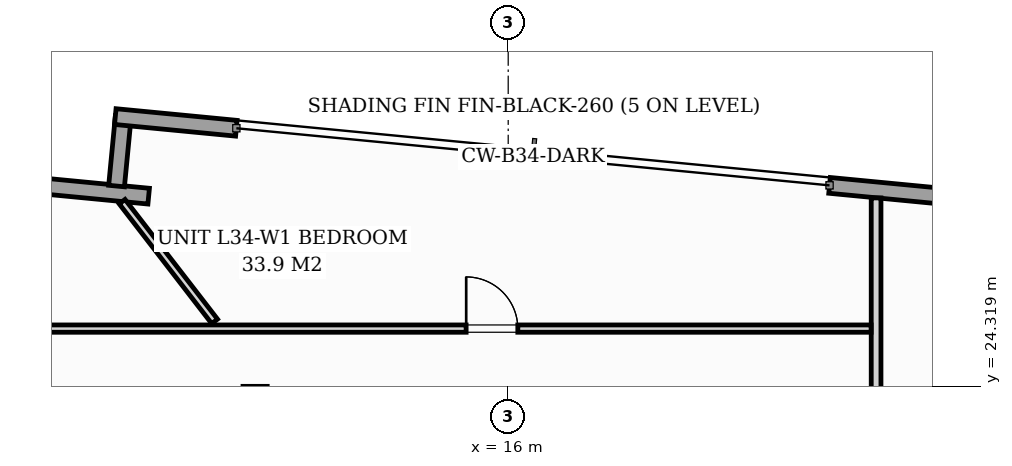
"""IFC4 building model, lengths in metres.
Left out: names, types, materials, properties, quantities, classifications, styles, units other than length and angle.
Written with IfcOpenShell. Run it as: python <this file> out.ifc"""

import sys

from ifc_helpers import new_model, si_unit, direction, frame, frame_2d, origin, origin_2d, place, context, subcontext, project, spatial, rectangle, i_section, extrude, source, transform, mapped, element, fill, save


model = new_model("IFC4")
c1 = context("Model", 3, precision=1e-05, world=origin(), true_north=direction((0.0, 1.0)))
c2 = subcontext(c1, "Body", "Model", "MODEL_VIEW")
j1 = project(units=[si_unit("LENGTHUNIT", "METRE"), si_unit("PLANEANGLEUNIT", "RADIAN")], contexts=[c1])
p1 = place(None, origin())
s1 = spatial("IfcSite", under=j1, at=p1, CompositionType="ELEMENT")
p2 = place(p1, origin())
s2 = spatial("IfcBuilding", under=s1, at=p2, CompositionType="ELEMENT")
p3 = place(p2, frame((0.0, 0.0, 119.4)))
s3 = spatial("IfcBuildingStorey", under=s2, at=p3, CompositionType="ELEMENT", Elevation=119.4)
m1 = source(origin(), c2, "Body", "SweptSolid", [
    extrude(i_section(OverallWidth=0.438, OverallDepth=1.011, WebThickness=0.041, FlangeThickness=0.074, FilletRadius=0.024, at=origin_2d()), origin(), (0.0, 0.0, 1.0), 6.635),
])
p4 = place(p3, frame((12.212, 22.752, 0.175), z_axis=(-0.243413874896, 0.703453219409, 0.66775987721), x_axis=(0.218359881802, -0.631048504974, 0.744376750301)))
e1 = element("IfcColumn", 1, at=p4, inside=s3, PredefinedType="COLUMN", context=c2, shape_type="MappedRepresentation", body=[
    mapped(m1, transform((0.0, 0.0, 0.0), scale=1.0)),
])
m2 = source(origin(), c2, "Body", "SweptSolid", [
    extrude(i_section(OverallWidth=0.438, OverallDepth=1.011, WebThickness=0.041, FlangeThickness=0.074, FilletRadius=0.024, at=origin_2d()), origin(), (0.0, 0.0, 1.0), 5.536),
])
p5 = place(p3, frame((25.221, 25.412, 0.139), z_axis=(-0.550407983816, 0.189202744437, 0.813174872244), x_axis=(0.769008579573, -0.264346699228, 0.582019438809)))
e2 = element("IfcColumn", 2, at=p5, inside=s3, PredefinedType="COLUMN", context=c2, shape_type="MappedRepresentation", body=[
    mapped(m2, transform((0.0, 0.0, 0.0), scale=1.0)),
])
p6 = place(p3, frame((8.045, 27.643, 0.0), z_axis=(0.0, 0.0, 1.0), x_axis=(0.995401395194, -0.095791766065, 0.0)))
e3 = element("IfcWall", 3, at=p6, inside=s3, PredefinedType="STANDARD", context=c2, shape_type="SweptSolid", body=[
    extrude(rectangle(XDim=2.052, YDim=0.26, at=frame_2d((1.026, 0.0))), origin(), (0.0, 0.0, 1.0), 4.78),
])
p7 = place(p3, frame((9.559, 27.612, 0.0), z_axis=(0.0, 0.0, 1.0), x_axis=(0.095971333708, 0.995384098279, 0.0)))
e4 = element("IfcWall", 4, at=p7, inside=s3, PredefinedType="STANDARD", context=c2, shape_type="SweptSolid", body=[
    extrude(rectangle(XDim=1.15, YDim=0.26, at=frame_2d((0.575, 0.0))), origin(), (0.0, 0.0, 1.0), 4.78),
])
p8 = place(p3, frame((9.539, 28.754, 0.0), z_axis=(0.0, 0.0, 1.0), x_axis=(0.995397839199, -0.095828710298, 0.0)))
e5 = element("IfcWall", 5, at=p8, inside=s3, PredefinedType="STANDARD", context=c2, shape_type="SweptSolid", body=[
    extrude(rectangle(XDim=2.0, YDim=0.26, at=frame_2d((1.0, 0.0))), origin(), (0.0, 0.0, 1.0), 4.78),
])
p9 = place(p3, frame((21.284, 27.624, 0.0), z_axis=(0.0, 0.0, 1.0), x_axis=(0.995391866735, -0.09589072759, 0.0)))
e6 = element("IfcWall", 6, at=p9, inside=s3, PredefinedType="STANDARD", context=c2, shape_type="SweptSolid", body=[
    extrude(rectangle(XDim=1.8, YDim=0.26, at=frame_2d((0.9, 0.0))), origin(), (0.0, 0.0, 1.0), 4.78),
])
p10 = place(p3, frame((22.05, 12.632, 0.0), z_axis=(0.0, 0.0, 1.0), x_axis=(0.0, 1.0, 0.0)))
e7 = element("IfcWall", 7, at=p10, inside=s3, PredefinedType="PARTITIONING", context=c2, shape_type="SweptSolid", body=[
    extrude(rectangle(XDim=14.785, YDim=0.16, at=frame_2d((7.393, 0.0))), origin(), (0.0, 0.0, 1.0), 4.78),
])
p11 = place(p10, frame((0.493, 0.0, 0.0)))
e8 = element("IfcOpeningElement", 8, at=p11, cuts=e7, PredefinedType="OPENING", context=c2, shape_type="SweptSolid", body=[
    extrude(rectangle(XDim=0.95, YDim=2.06, at=frame_2d((0.475, 1.03))), frame((0.0, 0.09, 0.0), z_axis=(0.0, -1.0, 0.0), x_axis=(1.0, 0.0, 0.0)), (0.0, 0.0, 1.0), 0.18),
])
p12 = place(p3, frame((6.772, 25.268, 0.0), z_axis=(0.0, 0.0, 1.0), x_axis=(1.0, 0.0, 0.0)))
e9 = element("IfcWall", 9, at=p12, inside=s3, PredefinedType="PARTITIONING", context=c2, shape_type="SweptSolid", body=[
    extrude(rectangle(XDim=15.196, YDim=0.12, at=frame_2d((7.598, 0.0))), origin(), (0.0, 0.0, 1.0), 4.78),
])
p13 = place(p12, frame((8.536, 0.0, 0.0)))
e10 = element("IfcOpeningElement", 10, at=p13, cuts=e9, PredefinedType="OPENING", context=c2, shape_type="SweptSolid", body=[
    extrude(rectangle(XDim=0.85, YDim=2.05, at=frame_2d((0.425, 1.025))), frame((0.0, 0.07, 0.0), z_axis=(0.0, -1.0, 0.0), x_axis=(1.0, 0.0, 0.0)), (0.0, 0.0, 1.0), 0.14),
])
p14 = place(p3, frame((11.172, 25.387, 0.0), z_axis=(0.0, 0.0, 1.0), x_axis=(-0.611369296281, 0.791345426198, 0.0)))
e11 = element("IfcWall", 11, at=p14, inside=s3, PredefinedType="PARTITIONING", context=c2, shape_type="SweptSolid", body=[
    extrude(rectangle(XDim=2.488, YDim=0.12, at=frame_2d((1.244, 0.0))), origin(), (0.0, 0.0, 1.0), 4.78),
])
m3 = source(origin(), c2, "Body", "SweptSolid", [
    extrude(rectangle(XDim=0.85, YDim=2.05, at=frame_2d((0.425, 1.025))), frame((0.0, 0.025, 0.0), z_axis=(0.0, -1.0, 0.0), x_axis=(1.0, 0.0, 0.0)), (0.0, 0.0, 1.0), 0.05),
])
p15 = place(p13, origin())
e12 = element("IfcDoor", 12, at=p15, inside=s3, OperationType="SINGLE_SWING_LEFT", PredefinedType="DOOR", context=c2, shape_type="MappedRepresentation", body=[
    mapped(m3, transform((0.0, 0.0, 0.0), scale=1.0)),
])
fill(e10, e12)
save(model, sys.argv[1])
